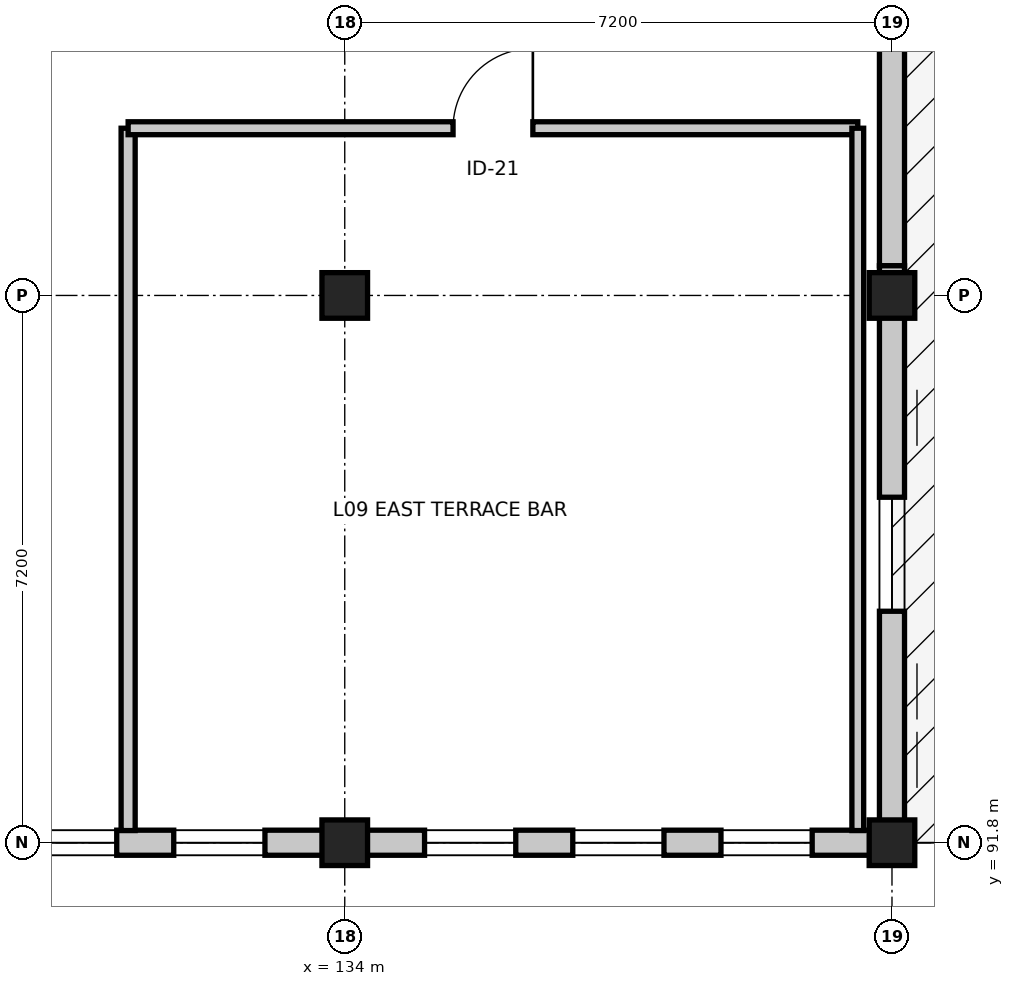
"""IFC4 building model, lengths in metres.
Left out: names, types, materials, properties, quantities, classifications, styles, units other than length and angle.
Written with IfcOpenShell. Run it as: python <this file> out.ifc"""

import sys

from ifc_helpers import new_model, si_unit, direction, frame, frame_2d, origin, origin_2d, place, context, subcontext, project, spatial, rectangle, extrude, element, fill, save


model = new_model("IFC4")
c1 = context("Model", 3, precision=1e-05, world=origin(), true_north=direction((0.0, 1.0)))
c2 = subcontext(c1, "Body", "Model", "MODEL_VIEW")
j1 = project(units=[si_unit("LENGTHUNIT", "METRE"), si_unit("PLANEANGLEUNIT", "RADIAN")], contexts=[c1])
p1 = place(None, origin())
s1 = spatial("IfcSite", under=j1, at=p1, CompositionType="ELEMENT")
p2 = place(p1, origin())
s2 = spatial("IfcBuilding", under=s1, at=p2, CompositionType="ELEMENT")
p3 = place(p2, frame((0.0, 0.0, 37.2)))
s3 = spatial("IfcBuildingStorey", under=s2, at=p3, CompositionType="ELEMENT", Elevation=37.2)
for number, where, z_axis, x_axis in (
    (1, (134.0, 91.8, 0.0), (0.0, 0.0, 1.0), (1.0, 0.0, 0.0)),
    (2, (134.0, 99.0, 0.0), (0.0, 0.0, 1.0), (1.0, 0.0, 0.0)),
):
    element("IfcColumn", number, at=place(p3, frame(where, z_axis=z_axis, x_axis=x_axis)), inside=s3, PredefinedType="COLUMN", context=c2, shape_type="SweptSolid", body=[
        extrude(rectangle(XDim=0.6, YDim=0.6, at=origin_2d()), origin(), (0.0, 0.0, 1.0), 5.2),
    ])
for number, where, z_axis, x_axis in (
    (3, (141.2, 91.8, 0.0), (0.0, 0.0, 1.0), (1.0, 0.0, 0.0)),
    (4, (141.2, 99.0, 0.0), (0.0, 0.0, 1.0), (1.0, 0.0, 0.0)),
):
    element("IfcColumn", number, at=place(p3, frame(where, z_axis=z_axis, x_axis=x_axis)), inside=s3, PredefinedType="COLUMN", context=c2, shape_type="SweptSolid", body=[
        extrude(rectangle(XDim=0.6, YDim=0.6, at=origin_2d()), origin(), (0.0, 0.0, 1.0), 3.6),
    ])
p4 = place(p3, frame((141.2, 106.981, 0.0), z_axis=(0.0, 0.0, 1.0), x_axis=(0.0, -1.0, 0.0)))
e5 = element("IfcWall", 5, at=p4, inside=s3, PredefinedType="STANDARD", context=c2, shape_type="SweptSolid", body=[
    extrude(rectangle(XDim=7.591, YDim=0.33, at=frame_2d((3.795, 0.0))), origin(), (0.0, 0.0, 1.0), 2.715),
])
p5 = place(p4, frame((3.045, 0.0, 0.75)))
e6 = element("IfcOpeningElement", 6, at=p5, cuts=e5, PredefinedType="OPENING", context=c2, shape_type="SweptSolid", body=[
    extrude(rectangle(XDim=1.5, YDim=1.5, at=frame_2d((0.75, 0.75))), frame((0.0, 0.175, 0.0), z_axis=(0.0, -1.0, 0.0), x_axis=(1.0, 0.0, 0.0)), (0.0, 0.0, 1.0), 0.35),
])
p6 = place(p3, frame((141.2, 99.39, 0.0), z_axis=(0.0, 0.0, 1.0), x_axis=(0.0, -1.0, 0.0)))
e7 = element("IfcWall", 7, at=p6, inside=s3, PredefinedType="STANDARD", context=c2, shape_type="SweptSolid", body=[
    extrude(rectangle(XDim=7.59, YDim=0.33, at=frame_2d((3.795, 0.0))), origin(), (0.0, 0.0, 1.0), 2.715),
])
p7 = place(p6, frame((3.045, 0.0, 0.75)))
e8 = element("IfcOpeningElement", 8, at=p7, cuts=e7, PredefinedType="OPENING", context=c2, shape_type="SweptSolid", body=[
    extrude(rectangle(XDim=1.5, YDim=1.5, at=frame_2d((0.75, 0.75))), frame((0.0, 0.175, 0.0), z_axis=(0.0, -1.0, 0.0), x_axis=(1.0, 0.0, 0.0)), (0.0, 0.0, 1.0), 0.35),
])
p8 = place(p3, frame((141.2, 91.8, 0.0), z_axis=(0.0, 0.0, 1.0), x_axis=(-1.0, 0.0, 0.0)))
e9 = element("IfcWall", 9, at=p8, inside=s3, PredefinedType="STANDARD", context=c2, shape_type="SweptSolid", body=[
    extrude(rectangle(XDim=7.2, YDim=0.33, at=frame_2d((3.6, 0.0))), origin(), (0.0, 0.0, 1.0), 2.86),
])
p9 = place(p8, frame((3.0, 0.0, 0.75)))
e10 = element("IfcOpeningElement", 10, at=p9, cuts=e9, PredefinedType="OPENING", context=c2, shape_type="SweptSolid", body=[
    extrude(rectangle(XDim=1.2, YDim=1.8, at=frame_2d((0.6, 0.9))), frame((0.0, 0.175, 0.0), z_axis=(0.0, -1.0, 0.0), x_axis=(1.0, 0.0, 0.0)), (0.0, 0.0, 1.0), 0.35),
])
p10 = place(p8, frame((1.05, 0.0, 0.85)))
e11 = element("IfcOpeningElement", 11, at=p10, cuts=e9, PredefinedType="OPENING", context=c2, shape_type="SweptSolid", body=[
    extrude(rectangle(XDim=1.2, YDim=1.8, at=frame_2d((0.6, 0.9))), frame((0.0, 0.175, 0.0), z_axis=(0.0, -1.0, 0.0), x_axis=(1.0, 0.0, 0.0)), (0.0, 0.0, 1.0), 0.35),
])
p11 = place(p8, frame((4.95, 0.0, 0.85)))
e12 = element("IfcOpeningElement", 12, at=p11, cuts=e9, PredefinedType="OPENING", context=c2, shape_type="SweptSolid", body=[
    extrude(rectangle(XDim=1.2, YDim=1.8, at=frame_2d((0.6, 0.9))), frame((0.0, 0.175, 0.0), z_axis=(0.0, -1.0, 0.0), x_axis=(1.0, 0.0, 0.0)), (0.0, 0.0, 1.0), 0.35),
])
p12 = place(p3, frame((134.0, 91.8, 0.0), z_axis=(0.0, 0.0, 1.0), x_axis=(-1.0, 0.0, 0.0)))
e13 = element("IfcWall", 13, at=p12, inside=s3, PredefinedType="STANDARD", context=c2, shape_type="SweptSolid", body=[
    extrude(rectangle(XDim=7.2, YDim=0.33, at=frame_2d((3.6, 0.0))), origin(), (0.0, 0.0, 1.0), 2.86),
])
p13 = place(p12, frame((3.0, 0.0, 0.75)))
e14 = element("IfcOpeningElement", 14, at=p13, cuts=e13, PredefinedType="OPENING", context=c2, shape_type="SweptSolid", body=[
    extrude(rectangle(XDim=1.2, YDim=1.8, at=frame_2d((0.6, 0.9))), frame((0.0, 0.175, 0.0), z_axis=(0.0, -1.0, 0.0), x_axis=(1.0, 0.0, 0.0)), (0.0, 0.0, 1.0), 0.35),
])
p14 = place(p12, frame((1.05, 0.0, 0.85)))
e15 = element("IfcOpeningElement", 15, at=p14, cuts=e13, PredefinedType="OPENING", context=c2, shape_type="SweptSolid", body=[
    extrude(rectangle(XDim=1.2, YDim=1.8, at=frame_2d((0.6, 0.9))), frame((0.0, 0.175, 0.0), z_axis=(0.0, -1.0, 0.0), x_axis=(1.0, 0.0, 0.0)), (0.0, 0.0, 1.0), 0.35),
])
p15 = place(p12, frame((4.95, 0.0, 0.85)))
e16 = element("IfcOpeningElement", 16, at=p15, cuts=e13, PredefinedType="OPENING", context=c2, shape_type="SweptSolid", body=[
    extrude(rectangle(XDim=1.2, YDim=1.8, at=frame_2d((0.6, 0.9))), frame((0.0, 0.175, 0.0), z_axis=(0.0, -1.0, 0.0), x_axis=(1.0, 0.0, 0.0)), (0.0, 0.0, 1.0), 0.35),
])
p16 = place(p3, frame((131.15, 91.96, 0.0), z_axis=(0.0, 0.0, 1.0), x_axis=(0.0, 1.0, 0.0)))
e17 = element("IfcWall", 17, at=p16, inside=s3, PredefinedType="PARTITIONING", context=c2, shape_type="SweptSolid", body=[
    extrude(rectangle(XDim=9.24, YDim=0.185, at=frame_2d((4.62, 0.0))), origin(), (0.0, 0.0, 1.0), 3.38),
])
p17 = place(p3, frame((131.15, 101.2, 0.0), z_axis=(0.0, 0.0, 1.0), x_axis=(1.0, 0.0, 0.0)))
e18 = element("IfcWall", 18, at=p17, inside=s3, PredefinedType="PARTITIONING", context=c2, shape_type="SweptSolid", body=[
    extrude(rectangle(XDim=9.6, YDim=0.17, at=frame_2d((4.8, 0.0))), origin(), (0.0, 0.0, 1.0), 2.715),
])
p18 = place(p17, frame((4.275, 0.0, 0.0)))
e19 = element("IfcOpeningElement", 19, at=p18, cuts=e18, PredefinedType="OPENING", context=c2, shape_type="SweptSolid", body=[
    extrude(rectangle(XDim=1.05, YDim=2.18, at=frame_2d((0.525, 1.09))), frame((0.0, 0.095, 0.0), z_axis=(0.0, -1.0, 0.0), x_axis=(1.0, 0.0, 0.0)), (0.0, 0.0, 1.0), 0.19),
])
p19 = place(p3, frame((140.75, 101.2, 0.0), z_axis=(0.0, 0.0, 1.0), x_axis=(0.0, -1.0, 0.0)))
e20 = element("IfcWall", 20, at=p19, inside=s3, PredefinedType="PARTITIONING", context=c2, shape_type="SweptSolid", body=[
    extrude(rectangle(XDim=9.24, YDim=0.155, at=frame_2d((4.62, 0.0))), origin(), (0.0, 0.0, 1.0), 2.86),
])
p20 = place(p7, origin())
e21 = element("IfcWindow", 21, at=p20, inside=s3, PartitioningType="SINGLE_PANEL", PredefinedType="WINDOW", context=c2, shape_type="SweptSolid", body=[
    extrude(rectangle(XDim=1.5, YDim=1.5, at=frame_2d((0.75, 0.75))), frame((0.0, 0.03, 0.0), z_axis=(0.0, -1.0, 0.0), x_axis=(1.0, 0.0, 0.0)), (0.0, 0.0, 1.0), 0.06),
])
fill(e8, e21)
p21 = place(p9, origin())
e22 = element("IfcWindow", 22, at=p21, inside=s3, PartitioningType="SINGLE_PANEL", PredefinedType="WINDOW", context=c2, shape_type="SweptSolid", body=[
    extrude(rectangle(XDim=1.2, YDim=1.8, at=frame_2d((0.6, 0.9))), frame((0.0, 0.03, 0.0), z_axis=(0.0, -1.0, 0.0), x_axis=(1.0, 0.0, 0.0)), (0.0, 0.0, 1.0), 0.06),
])
fill(e10, e22)
p22 = place(p10, origin())
e23 = element("IfcWindow", 23, at=p22, inside=s3, PartitioningType="SINGLE_PANEL", PredefinedType="WINDOW", context=c2, shape_type="SweptSolid", body=[
    extrude(rectangle(XDim=1.2, YDim=1.8, at=frame_2d((0.6, 0.9))), frame((0.0, 0.03, 0.0), z_axis=(0.0, -1.0, 0.0), x_axis=(1.0, 0.0, 0.0)), (0.0, 0.0, 1.0), 0.06),
])
fill(e11, e23)
p23 = place(p11, origin())
e24 = element("IfcWindow", 24, at=p23, inside=s3, PartitioningType="SINGLE_PANEL", PredefinedType="WINDOW", context=c2, shape_type="SweptSolid", body=[
    extrude(rectangle(XDim=1.2, YDim=1.8, at=frame_2d((0.6, 0.9))), frame((0.0, 0.03, 0.0), z_axis=(0.0, -1.0, 0.0), x_axis=(1.0, 0.0, 0.0)), (0.0, 0.0, 1.0), 0.06),
])
fill(e12, e24)
p24 = place(p13, origin())
e25 = element("IfcWindow", 25, at=p24, inside=s3, PartitioningType="SINGLE_PANEL", PredefinedType="WINDOW", context=c2, shape_type="SweptSolid", body=[
    extrude(rectangle(XDim=1.2, YDim=1.8, at=frame_2d((0.6, 0.9))), frame((0.0, 0.03, 0.0), z_axis=(0.0, -1.0, 0.0), x_axis=(1.0, 0.0, 0.0)), (0.0, 0.0, 1.0), 0.06),
])
fill(e14, e25)
p25 = place(p14, origin())
e26 = element("IfcWindow", 26, at=p25, inside=s3, PartitioningType="SINGLE_PANEL", PredefinedType="WINDOW", context=c2, shape_type="SweptSolid", body=[
    extrude(rectangle(XDim=1.2, YDim=1.8, at=frame_2d((0.6, 0.9))), frame((0.0, 0.03, 0.0), z_axis=(0.0, -1.0, 0.0), x_axis=(1.0, 0.0, 0.0)), (0.0, 0.0, 1.0), 0.06),
])
fill(e15, e26)
p26 = place(p18, origin())
e27 = element("IfcDoor", 27, at=p26, inside=s3, OperationType="SINGLE_SWING_RIGHT", PredefinedType="DOOR", context=c2, shape_type="SweptSolid", body=[
    extrude(rectangle(XDim=1.05, YDim=2.18, at=frame_2d((0.525, 1.09))), frame((0.0, 0.025, 0.0), z_axis=(0.0, -1.0, 0.0), x_axis=(1.0, 0.0, 0.0)), (0.0, 0.0, 1.0), 0.05),
])
fill(e19, e27)
save(model, sys.argv[1])
